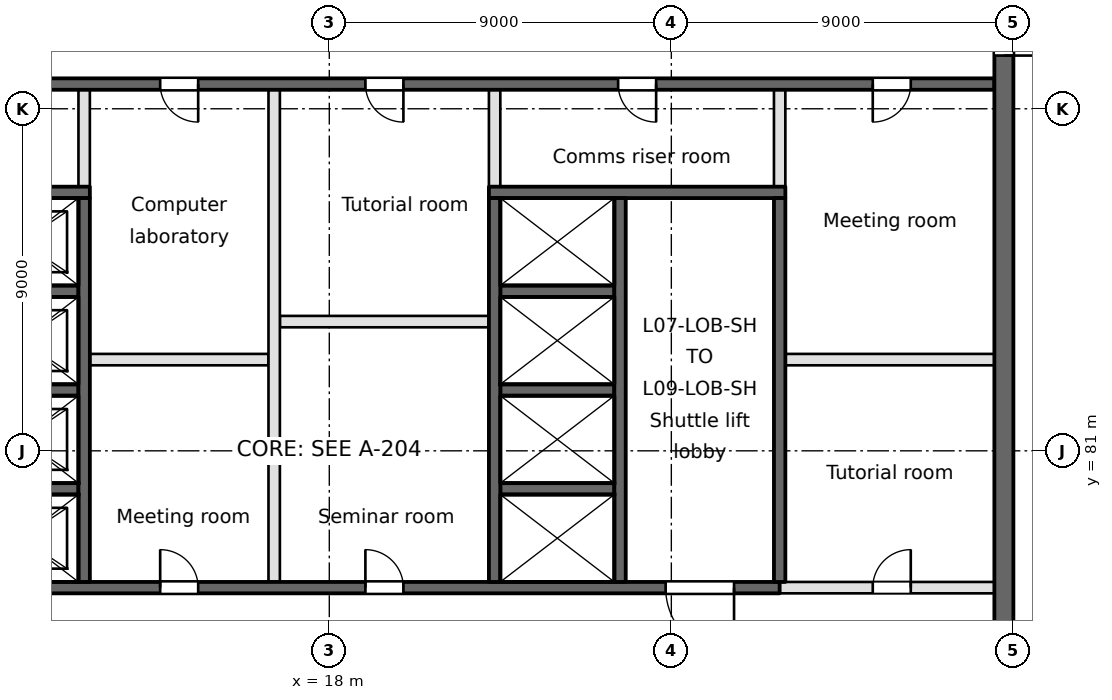
"""IFC4 building model, lengths in metres.
Left out: names, types, materials, properties, quantities, classifications, styles, units other than length and angle.
Written with IfcOpenShell. Run it as: python <this file> out.ifc"""

import sys

from ifc_helpers import new_model, si_unit, direction, frame, frame_2d, origin, place, context, subcontext, project, spatial, rectangle, extrude, element, fill, save


model = new_model("IFC4")
c1 = context("Model", 3, precision=1e-05, world=origin(), true_north=direction((0.0, 1.0)))
c2 = subcontext(c1, "Body", "Model", "MODEL_VIEW")
j1 = project(units=[si_unit("LENGTHUNIT", "METRE"), si_unit("PLANEANGLEUNIT", "RADIAN")], contexts=[c1])
p1 = place(None, origin())
s1 = spatial("IfcSite", under=j1, at=p1, CompositionType="ELEMENT")
p2 = place(p1, origin())
s2 = spatial("IfcBuilding", under=s1, at=p2, CompositionType="ELEMENT")
p3 = place(p2, frame((0.0, 0.0, 35.8)))
s3 = spatial("IfcBuildingStorey", under=s2, at=p3, CompositionType="ELEMENT", Elevation=35.8)
p4 = place(p3, frame((0.9, 77.4, -0.4), z_axis=(0.0, 0.0, 1.0), x_axis=(1.0, 0.0, 0.0)))
e1 = element("IfcWall", 1, at=p4, inside=s3, PredefinedType="SOLIDWALL", context=c2, shape_type="SweptSolid", body=[
    extrude(rectangle(XDim=28.95, YDim=0.3, at=frame_2d((14.475, 0.0))), origin(), (0.0, 0.0, 1.0), 3.7),
])
p5 = place(p4, frame((4.35, 0.0, 0.4)))
e2 = element("IfcOpeningElement", 2, at=p5, cuts=e1, PredefinedType="OPENING", context=c2, shape_type="SweptSolid", body=[
    extrude(rectangle(XDim=1.8, YDim=2.1, at=frame_2d((0.9, 1.05))), frame((0.0, 0.15, 0.0), z_axis=(0.0, -1.0, 0.0), x_axis=(1.0, 0.0, 0.0)), (0.0, 0.0, 1.0), 0.3),
])
p6 = place(p4, frame((25.95, 0.0, 0.4)))
e3 = element("IfcOpeningElement", 3, at=p6, cuts=e1, PredefinedType="OPENING", context=c2, shape_type="SweptSolid", body=[
    extrude(rectangle(XDim=1.8, YDim=2.1, at=frame_2d((0.9, 1.05))), frame((0.0, 0.15, 0.0), z_axis=(0.0, -1.0, 0.0), x_axis=(1.0, 0.0, 0.0)), (0.0, 0.0, 1.0), 0.3),
])
p7 = place(p4, frame((12.65, 0.0, 0.4)))
e4 = element("IfcOpeningElement", 4, at=p7, cuts=e1, PredefinedType="OPENING", context=c2, shape_type="SweptSolid", body=[
    extrude(rectangle(XDim=1.0, YDim=2.1, at=frame_2d((0.5, 1.05))), frame((0.0, 0.15, 0.0), z_axis=(0.0, -1.0, 0.0), x_axis=(1.0, 0.0, 0.0)), (0.0, 0.0, 1.0), 0.3),
])
p8 = place(p4, frame((18.05, 0.0, 0.4)))
e5 = element("IfcOpeningElement", 5, at=p8, cuts=e1, PredefinedType="OPENING", context=c2, shape_type="SweptSolid", body=[
    extrude(rectangle(XDim=1.0, YDim=2.1, at=frame_2d((0.5, 1.05))), frame((0.0, 0.15, 0.0), z_axis=(0.0, -1.0, 0.0), x_axis=(1.0, 0.0, 0.0)), (0.0, 0.0, 1.0), 0.3),
])
p9 = place(p3, frame((29.85, 77.4, 0.0), z_axis=(0.0, 0.0, 1.0), x_axis=(1.0, 0.0, 0.0)))
e6 = element("IfcWall", 6, at=p9, inside=s3, PredefinedType="PARTITIONING", context=c2, shape_type="SweptSolid", body=[
    extrude(rectangle(XDim=5.65, YDim=0.3, at=frame_2d((2.825, 0.0))), origin(), (0.0, 0.0, 1.0), 3.3),
])
p10 = place(p9, frame((2.45, 0.0, 0.0)))
e7 = element("IfcOpeningElement", 7, at=p10, cuts=e6, PredefinedType="OPENING", context=c2, shape_type="SweptSolid", body=[
    extrude(rectangle(XDim=1.0, YDim=2.1, at=frame_2d((0.5, 1.05))), frame((0.0, 0.15, 0.0), z_axis=(0.0, -1.0, 0.0), x_axis=(1.0, 0.0, 0.0)), (0.0, 0.0, 1.0), 0.3),
])
for number, where, z_axis, x_axis in (
    (8, (8.4, 80.0, -0.4), (0.0, 0.0, 1.0), (1.0, 0.0, 0.0)),
    (9, (22.5, 80.0, -0.4), (0.0, 0.0, 1.0), (1.0, 0.0, 0.0)),
    (10, (8.4, 82.6, -0.4), (0.0, 0.0, 1.0), (1.0, 0.0, 0.0)),
    (11, (22.5, 82.6, -0.4), (0.0, 0.0, 1.0), (1.0, 0.0, 0.0)),
):
    element("IfcWall", number, at=place(p3, frame(where, z_axis=z_axis, x_axis=x_axis)), inside=s3, PredefinedType="SOLIDWALL", context=c2, shape_type="SweptSolid", body=[
        extrude(rectangle(XDim=3.0, YDim=0.3, at=frame_2d((1.5, 0.0))), origin(), (0.0, 0.0, 1.0), 3.7),
    ])
p11 = place(p3, frame((11.7, 83.4, 0.0), z_axis=(0.0, 0.0, 1.0), x_axis=(1.0, 0.0, 0.0)))
e12 = element("IfcWall", 12, at=p11, inside=s3, PredefinedType="PARTITIONING", context=c2, shape_type="SweptSolid", body=[
    extrude(rectangle(XDim=4.7, YDim=0.3, at=frame_2d((2.35, 0.0))), origin(), (0.0, 0.0, 1.0), 3.3),
])
for number, where, z_axis, x_axis in (
    (13, (30.0, 83.4, 0.0), (0.0, 0.0, 1.0), (1.0, 0.0, 0.0)),
    (14, (16.7, 84.4, 0.0), (0.0, 0.0, 1.0), (1.0, 0.0, 0.0)),
):
    element("IfcWall", number, at=place(p3, frame(where, z_axis=z_axis, x_axis=x_axis)), inside=s3, PredefinedType="PARTITIONING", context=c2, shape_type="SweptSolid", body=[
        extrude(rectangle(XDim=5.5, YDim=0.3, at=frame_2d((2.75, 0.0))), origin(), (0.0, 0.0, 1.0), 3.3),
    ])
for number, where, z_axis, x_axis in (
    (15, (8.4, 85.2, -0.4), (0.0, 0.0, 1.0), (1.0, 0.0, 0.0)),
    (16, (22.5, 85.2, -0.4), (0.0, 0.0, 1.0), (1.0, 0.0, 0.0)),
):
    element("IfcWall", number, at=place(p3, frame(where, z_axis=z_axis, x_axis=x_axis)), inside=s3, PredefinedType="SOLIDWALL", context=c2, shape_type="SweptSolid", body=[
        extrude(rectangle(XDim=3.0, YDim=0.3, at=frame_2d((1.5, 0.0))), origin(), (0.0, 0.0, 1.0), 3.7),
    ])
p12 = place(p3, frame((0.9, 87.8, -0.4), z_axis=(0.0, 0.0, 1.0), x_axis=(1.0, 0.0, 0.0)))
e17 = element("IfcWall", 17, at=p12, inside=s3, PredefinedType="SOLIDWALL", context=c2, shape_type="SweptSolid", body=[
    extrude(rectangle(XDim=10.8, YDim=0.3, at=frame_2d((5.4, 0.0))), origin(), (0.0, 0.0, 1.0), 3.7),
])
p13 = place(p3, frame((22.2, 87.8, -0.4), z_axis=(0.0, 0.0, 1.0), x_axis=(1.0, 0.0, 0.0)))
e18 = element("IfcWall", 18, at=p13, inside=s3, PredefinedType="SOLIDWALL", context=c2, shape_type="SweptSolid", body=[
    extrude(rectangle(XDim=7.8, YDim=0.3, at=frame_2d((3.9, 0.0))), origin(), (0.0, 0.0, 1.0), 3.7),
])
p14 = place(p3, frame((0.9, 90.65, -0.4), z_axis=(0.0, 0.0, 1.0), x_axis=(1.0, 0.0, 0.0)))
e19 = element("IfcWall", 19, at=p14, inside=s3, PredefinedType="SOLIDWALL", context=c2, shape_type="SweptSolid", body=[
    extrude(rectangle(XDim=34.6, YDim=0.3, at=frame_2d((17.3, 0.0))), origin(), (0.0, 0.0, 1.0), 3.7),
])
p15 = place(p14, frame((4.75, 0.0, 0.4)))
e20 = element("IfcOpeningElement", 20, at=p15, cuts=e19, PredefinedType="OPENING", context=c2, shape_type="SweptSolid", body=[
    extrude(rectangle(XDim=1.0, YDim=2.1, at=frame_2d((0.5, 1.05))), frame((0.0, 0.15, 0.0), z_axis=(0.0, -1.0, 0.0), x_axis=(1.0, 0.0, 0.0)), (0.0, 0.0, 1.0), 0.3),
])
p16 = place(p14, frame((24.7, 0.0, 0.4)))
e21 = element("IfcOpeningElement", 21, at=p16, cuts=e19, PredefinedType="OPENING", context=c2, shape_type="SweptSolid", body=[
    extrude(rectangle(XDim=1.0, YDim=2.1, at=frame_2d((0.5, 1.05))), frame((0.0, 0.15, 0.0), z_axis=(0.0, -1.0, 0.0), x_axis=(1.0, 0.0, 0.0)), (0.0, 0.0, 1.0), 0.3),
])
p17 = place(p14, frame((12.65, 0.0, 0.4)))
e22 = element("IfcOpeningElement", 22, at=p17, cuts=e19, PredefinedType="OPENING", context=c2, shape_type="SweptSolid", body=[
    extrude(rectangle(XDim=1.0, YDim=2.1, at=frame_2d((0.5, 1.05))), frame((0.0, 0.15, 0.0), z_axis=(0.0, -1.0, 0.0), x_axis=(1.0, 0.0, 0.0)), (0.0, 0.0, 1.0), 0.3),
])
p18 = place(p14, frame((18.05, 0.0, 0.4)))
e23 = element("IfcOpeningElement", 23, at=p18, cuts=e19, PredefinedType="OPENING", context=c2, shape_type="SweptSolid", body=[
    extrude(rectangle(XDim=1.0, YDim=2.1, at=frame_2d((0.5, 1.05))), frame((0.0, 0.15, 0.0), z_axis=(0.0, -1.0, 0.0), x_axis=(1.0, 0.0, 0.0)), (0.0, 0.0, 1.0), 0.3),
])
p19 = place(p14, frame((31.4, 0.0, 0.4)))
e24 = element("IfcOpeningElement", 24, at=p19, cuts=e19, PredefinedType="OPENING", context=c2, shape_type="SweptSolid", body=[
    extrude(rectangle(XDim=1.0, YDim=2.1, at=frame_2d((0.5, 1.05))), frame((0.0, 0.15, 0.0), z_axis=(0.0, -1.0, 0.0), x_axis=(1.0, 0.0, 0.0)), (0.0, 0.0, 1.0), 0.3),
])
p20 = place(p3, frame((11.55, 77.55, -0.4), z_axis=(0.0, 0.0, 1.0), x_axis=(0.0, 1.0, 0.0)))
e25 = element("IfcWall", 25, at=p20, inside=s3, PredefinedType="SOLIDWALL", context=c2, shape_type="SweptSolid", body=[
    extrude(rectangle(XDim=10.1, YDim=0.3, at=frame_2d((5.05, 0.0))), origin(), (0.0, 0.0, 1.0), 3.7),
])
p21 = place(p3, frame((11.55, 87.95, 0.0), z_axis=(0.0, 0.0, 1.0), x_axis=(0.0, 1.0, 0.0)))
e26 = element("IfcWall", 26, at=p21, inside=s3, PredefinedType="PARTITIONING", context=c2, shape_type="SweptSolid", body=[
    extrude(rectangle(XDim=2.55, YDim=0.3, at=frame_2d((1.275, 0.0))), origin(), (0.0, 0.0, 1.0), 3.3),
])
p22 = place(p3, frame((16.55, 77.55, 0.0), z_axis=(0.0, 0.0, 1.0), x_axis=(0.0, 1.0, 0.0)))
e27 = element("IfcWall", 27, at=p22, inside=s3, PredefinedType="PARTITIONING", context=c2, shape_type="SweptSolid", body=[
    extrude(rectangle(XDim=12.95, YDim=0.3, at=frame_2d((6.475, 0.0))), origin(), (0.0, 0.0, 1.0), 3.3),
])
p23 = place(p3, frame((22.35, 77.55, -0.4), z_axis=(0.0, 0.0, 1.0), x_axis=(0.0, 1.0, 0.0)))
e28 = element("IfcWall", 28, at=p23, inside=s3, PredefinedType="SOLIDWALL", context=c2, shape_type="SweptSolid", body=[
    extrude(rectangle(XDim=10.1, YDim=0.3, at=frame_2d((5.05, 0.0))), origin(), (0.0, 0.0, 1.0), 3.7),
])
p24 = place(p3, frame((22.35, 87.95, 0.0), z_axis=(0.0, 0.0, 1.0), x_axis=(0.0, 1.0, 0.0)))
e29 = element("IfcWall", 29, at=p24, inside=s3, PredefinedType="PARTITIONING", context=c2, shape_type="SweptSolid", body=[
    extrude(rectangle(XDim=2.55, YDim=0.3, at=frame_2d((1.275, 0.0))), origin(), (0.0, 0.0, 1.0), 3.3),
])
for number, where, z_axis, x_axis in (
    (30, (25.65, 77.55, -0.4), (0.0, 0.0, 1.0), (0.0, 1.0, 0.0)),
    (31, (29.85, 77.55, -0.4), (0.0, 0.0, 1.0), (0.0, 1.0, 0.0)),
):
    element("IfcWall", number, at=place(p3, frame(where, z_axis=z_axis, x_axis=x_axis)), inside=s3, PredefinedType="SOLIDWALL", context=c2, shape_type="SweptSolid", body=[
        extrude(rectangle(XDim=10.1, YDim=0.3, at=frame_2d((5.05, 0.0))), origin(), (0.0, 0.0, 1.0), 3.7),
    ])
p25 = place(p3, frame((29.85, 87.95, 0.0), z_axis=(0.0, 0.0, 1.0), x_axis=(0.0, 1.0, 0.0)))
e32 = element("IfcWall", 32, at=p25, inside=s3, PredefinedType="PARTITIONING", context=c2, shape_type="SweptSolid", body=[
    extrude(rectangle(XDim=2.55, YDim=0.3, at=frame_2d((1.275, 0.0))), origin(), (0.0, 0.0, 1.0), 3.3),
])
p26 = place(p3, frame((35.75, 63.5, -0.4), z_axis=(0.0, 0.0, 1.0), x_axis=(0.0, 1.0, 0.0)))
e33 = element("IfcWall", 33, at=p26, inside=s3, PredefinedType="SOLIDWALL", context=c2, shape_type="SweptSolid", body=[
    extrude(rectangle(XDim=34.6, YDim=0.5, at=frame_2d((17.3, 0.0))), origin(), (0.0, 0.0, 1.0), 3.7),
])
p27 = place(p26, frame((9.7, 0.0, 0.4)))
e34 = element("IfcOpeningElement", 34, at=p27, cuts=e33, PredefinedType="OPENING", context=c2, shape_type="SweptSolid", body=[
    extrude(rectangle(XDim=2.4, YDim=2.1, at=frame_2d((1.2, 1.05))), frame((0.0, 0.25, 0.0), z_axis=(0.0, -1.0, 0.0), x_axis=(1.0, 0.0, 0.0)), (0.0, 0.0, 1.0), 0.5),
])
p28 = place(p26, frame((27.9, 0.0, 0.4)))
e35 = element("IfcOpeningElement", 35, at=p28, cuts=e33, PredefinedType="OPENING", context=c2, shape_type="SweptSolid", body=[
    extrude(rectangle(XDim=1.5, YDim=2.1, at=frame_2d((0.75, 1.05))), frame((0.0, 0.25, 0.0), z_axis=(0.0, -1.0, 0.0), x_axis=(1.0, 0.0, 0.0)), (0.0, 0.0, 1.0), 0.5),
])
p29 = place(p26, frame((1.5, 0.0, 0.4)))
e36 = element("IfcOpeningElement", 36, at=p29, cuts=e33, PredefinedType="OPENING", context=c2, shape_type="SweptSolid", body=[
    extrude(rectangle(XDim=1.2, YDim=2.1, at=frame_2d((0.6, 1.05))), frame((0.0, 0.25, 0.0), z_axis=(0.0, -1.0, 0.0), x_axis=(1.0, 0.0, 0.0)), (0.0, 0.0, 1.0), 0.5),
])
p30 = place(p6, frame((1.8, 0.0, 0.0), z_axis=(0.0, 0.0, 1.0), x_axis=(-1.0, 0.0, 0.0)))
e37 = element("IfcDoor", 37, at=p30, inside=s3, OperationType="SINGLE_SWING_LEFT", PredefinedType="DOOR", context=c2, shape_type="SweptSolid", body=[
    extrude(rectangle(XDim=1.8, YDim=2.1, at=frame_2d((0.9, 1.05))), frame((0.0, 0.025, 0.0), z_axis=(0.0, -1.0, 0.0), x_axis=(1.0, 0.0, 0.0)), (0.0, 0.0, 1.0), 0.05),
])
fill(e3, e37)
p31 = place(p28, frame((1.5, 0.0, 0.0), z_axis=(0.0, 0.0, 1.0), x_axis=(-1.0, 0.0, 0.0)))
e38 = element("IfcDoor", 38, at=p31, inside=s3, OperationType="SINGLE_SWING_RIGHT", PredefinedType="DOOR", context=c2, shape_type="SweptSolid", body=[
    extrude(rectangle(XDim=1.5, YDim=2.1, at=frame_2d((0.75, 1.05))), frame((0.0, 0.025, 0.0), z_axis=(0.0, -1.0, 0.0), x_axis=(1.0, 0.0, 0.0)), (0.0, 0.0, 1.0), 0.05),
])
fill(e35, e38)
p32 = place(p16, frame((1.0, 0.0, 0.0), z_axis=(0.0, 0.0, 1.0), x_axis=(-1.0, 0.0, 0.0)))
e39 = element("IfcDoor", 39, at=p32, inside=s3, OperationType="SINGLE_SWING_LEFT", PredefinedType="DOOR", context=c2, shape_type="SweptSolid", body=[
    extrude(rectangle(XDim=1.0, YDim=2.1, at=frame_2d((0.5, 1.05))), frame((0.0, 0.025, 0.0), z_axis=(0.0, -1.0, 0.0), x_axis=(1.0, 0.0, 0.0)), (0.0, 0.0, 1.0), 0.05),
])
fill(e21, e39)
p33 = place(p7, origin())
e40 = element("IfcDoor", 40, at=p33, inside=s3, OperationType="SINGLE_SWING_LEFT", PredefinedType="DOOR", context=c2, shape_type="SweptSolid", body=[
    extrude(rectangle(XDim=1.0, YDim=2.1, at=frame_2d((0.5, 1.05))), frame((0.0, 0.025, 0.0), z_axis=(0.0, -1.0, 0.0), x_axis=(1.0, 0.0, 0.0)), (0.0, 0.0, 1.0), 0.05),
])
fill(e4, e40)
p34 = place(p17, frame((1.0, 0.0, 0.0), z_axis=(0.0, 0.0, 1.0), x_axis=(-1.0, 0.0, 0.0)))
e41 = element("IfcDoor", 41, at=p34, inside=s3, OperationType="SINGLE_SWING_LEFT", PredefinedType="DOOR", context=c2, shape_type="SweptSolid", body=[
    extrude(rectangle(XDim=1.0, YDim=2.1, at=frame_2d((0.5, 1.05))), frame((0.0, 0.025, 0.0), z_axis=(0.0, -1.0, 0.0), x_axis=(1.0, 0.0, 0.0)), (0.0, 0.0, 1.0), 0.05),
])
fill(e22, e41)
p35 = place(p8, origin())
e42 = element("IfcDoor", 42, at=p35, inside=s3, OperationType="SINGLE_SWING_LEFT", PredefinedType="DOOR", context=c2, shape_type="SweptSolid", body=[
    extrude(rectangle(XDim=1.0, YDim=2.1, at=frame_2d((0.5, 1.05))), frame((0.0, 0.025, 0.0), z_axis=(0.0, -1.0, 0.0), x_axis=(1.0, 0.0, 0.0)), (0.0, 0.0, 1.0), 0.05),
])
fill(e5, e42)
p36 = place(p18, frame((1.0, 0.0, 0.0), z_axis=(0.0, 0.0, 1.0), x_axis=(-1.0, 0.0, 0.0)))
e43 = element("IfcDoor", 43, at=p36, inside=s3, OperationType="SINGLE_SWING_LEFT", PredefinedType="DOOR", context=c2, shape_type="SweptSolid", body=[
    extrude(rectangle(XDim=1.0, YDim=2.1, at=frame_2d((0.5, 1.05))), frame((0.0, 0.025, 0.0), z_axis=(0.0, -1.0, 0.0), x_axis=(1.0, 0.0, 0.0)), (0.0, 0.0, 1.0), 0.05),
])
fill(e23, e43)
p37 = place(p10, origin())
e44 = element("IfcDoor", 44, at=p37, inside=s3, OperationType="SINGLE_SWING_RIGHT", PredefinedType="DOOR", context=c2, shape_type="SweptSolid", body=[
    extrude(rectangle(XDim=1.0, YDim=2.1, at=frame_2d((0.5, 1.05))), frame((0.0, 0.025, 0.0), z_axis=(0.0, -1.0, 0.0), x_axis=(1.0, 0.0, 0.0)), (0.0, 0.0, 1.0), 0.05),
])
fill(e7, e44)
p38 = place(p19, frame((1.0, 0.0, 0.0), z_axis=(0.0, 0.0, 1.0), x_axis=(-1.0, 0.0, 0.0)))
e45 = element("IfcDoor", 45, at=p38, inside=s3, OperationType="SINGLE_SWING_RIGHT", PredefinedType="DOOR", context=c2, shape_type="SweptSolid", body=[
    extrude(rectangle(XDim=1.0, YDim=2.1, at=frame_2d((0.5, 1.05))), frame((0.0, 0.025, 0.0), z_axis=(0.0, -1.0, 0.0), x_axis=(1.0, 0.0, 0.0)), (0.0, 0.0, 1.0), 0.05),
])
fill(e24, e45)
save(model, sys.argv[1])
